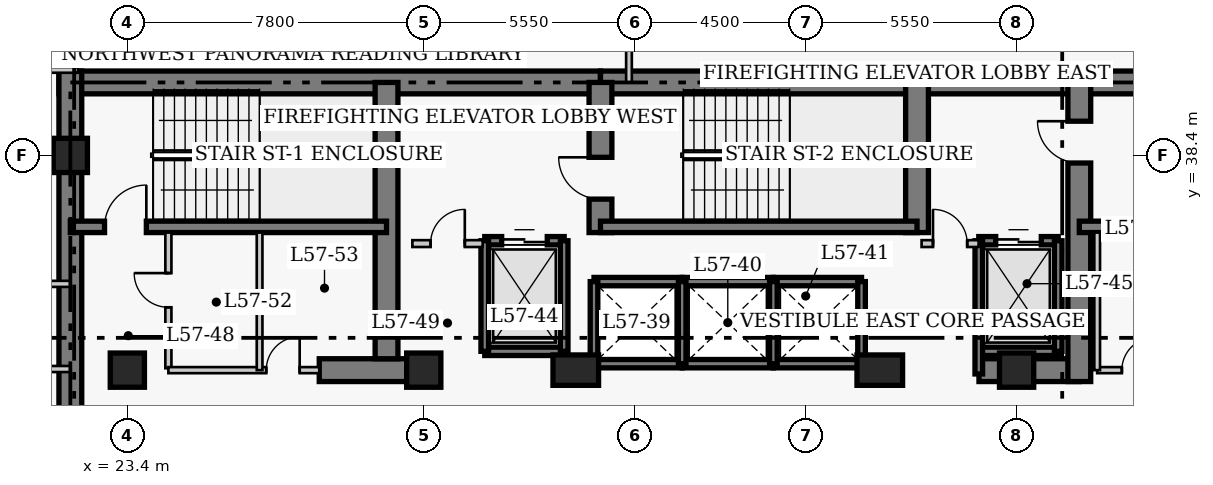
"""IFC4 building model, lengths in metres.
Left out: names, types, materials, properties, quantities, classifications, styles, units other than length and angle.
Written with IfcOpenShell. Run it as: python <this file> out.ifc"""

import sys

from ifc_helpers import new_model, si_unit, direction, frame, frame_2d, origin, origin_2d, place, context, subcontext, project, spatial, rectangle, extrude, element, fill, save


model = new_model("IFC4")
c1 = context("Model", 3, precision=1e-05, world=origin(), true_north=direction((0.0, 1.0)))
c2 = subcontext(c1, "Body", "Model", "MODEL_VIEW")
j1 = project(units=[si_unit("LENGTHUNIT", "METRE"), si_unit("PLANEANGLEUNIT", "RADIAN")], contexts=[c1])
p1 = place(None, origin())
s1 = spatial("IfcSite", under=j1, at=p1, CompositionType="ELEMENT")
p2 = place(p1, origin())
s2 = spatial("IfcBuilding", under=s1, at=p2, CompositionType="ELEMENT")
p3 = place(p2, frame((0.0, 0.0, 228.0)))
s3 = spatial("IfcBuildingStorey", under=s2, at=p3, CompositionType="ELEMENT", Elevation=228.0)
p4 = place(p3, frame((21.6, 40.32, 0.0), z_axis=(0.0, 0.0, 1.0), x_axis=(1.0, 0.0, 0.0)))
e1 = element("IfcWall", 1, at=p4, inside=s3, PredefinedType="SHEAR", context=c2, shape_type="SweptSolid", body=[
    extrude(rectangle(XDim=14.25, YDim=0.6, at=frame_2d((7.125, 0.0))), origin(), (0.0, 0.0, 1.0), 3.9),
])
p5 = place(p3, frame((35.85, 40.32, 0.0), z_axis=(0.0, 0.0, 1.0), x_axis=(1.0, 0.0, 0.0)))
e2 = element("IfcWall", 2, at=p5, inside=s3, PredefinedType="SHEAR", context=c2, shape_type="SweptSolid", body=[
    extrude(rectangle(XDim=12.6, YDim=0.6, at=frame_2d((6.3, 0.0))), origin(), (0.0, 0.0, 1.0), 3.9),
])
p6 = place(p3, frame((48.45, 40.32, 0.0), z_axis=(0.0, 0.0, 1.0), x_axis=(1.0, 0.0, 0.0)))
e3 = element("IfcWall", 3, at=p6, inside=s3, PredefinedType="SHEAR", context=c2, shape_type="SweptSolid", body=[
    extrude(rectangle(XDim=8.67, YDim=0.6, at=frame_2d((4.335, 0.0))), origin(), (0.0, 0.0, 1.0), 3.9),
])
p7 = place(p3, frame((21.9, 27.05, 0.0), z_axis=(0.0, 0.0, 1.0), x_axis=(0.0, 1.0, 0.0)))
e4 = element("IfcWall", 4, at=p7, inside=s3, PredefinedType="SHEAR", context=c2, shape_type="SweptSolid", body=[
    extrude(rectangle(XDim=13.57, YDim=0.6, at=frame_2d((6.785, 0.0))), origin(), (0.0, 0.0, 1.0), 3.9),
])
p8 = place(p3, frame((28.45, 32.75, 0.0), z_axis=(0.0, 0.0, 1.0), x_axis=(1.0, 0.0, 0.0)))
e5 = element("IfcWall", 5, at=p8, inside=s3, PredefinedType="SHEAR", context=c2, shape_type="SweptSolid", body=[
    extrude(rectangle(XDim=2.4, YDim=0.6, at=frame_2d((1.2, 0.0))), origin(), (0.0, 0.0, 1.0), 3.9),
])
p9 = place(p3, frame((45.81, 32.75, 0.0), z_axis=(0.0, 0.0, 1.0), x_axis=(1.0, 0.0, 0.0)))
e6 = element("IfcWall", 6, at=p9, inside=s3, PredefinedType="SHEAR", context=c2, shape_type="SweptSolid", body=[
    extrude(rectangle(XDim=2.64, YDim=0.6, at=frame_2d((1.32, 0.0))), origin(), (0.0, 0.0, 1.0), 3.9),
])
p10 = place(p3, frame((30.22, 33.05, 0.0), z_axis=(0.0, 0.0, 1.0), x_axis=(0.0, 1.0, 0.0)))
e7 = element("IfcWall", 7, at=p10, inside=s3, PredefinedType="SHEAR", context=c2, shape_type="SweptSolid", body=[
    extrude(rectangle(XDim=7.27, YDim=0.6, at=frame_2d((3.635, 0.0))), origin(), (0.0, 0.0, 1.0), 3.9),
])
p11 = place(p3, frame((35.85, 36.37, 0.0), z_axis=(0.0, 0.0, 1.0), x_axis=(0.0, 1.0, 0.0)))
e8 = element("IfcWall", 8, at=p11, inside=s3, PredefinedType="SHEAR", context=c2, shape_type="SweptSolid", body=[
    extrude(rectangle(XDim=3.95, YDim=0.6, at=frame_2d((1.975, 0.0))), origin(), (0.0, 0.0, 1.0), 3.9),
])
p12 = place(p11, frame((0.88, 0.0, 0.0)))
e9 = element("IfcOpeningElement", 9, at=p12, cuts=e8, PredefinedType="OPENING", context=c2, shape_type="SweptSolid", body=[
    extrude(rectangle(XDim=1.1, YDim=2.15, at=frame_2d((0.55, 1.075))), frame((0.0, 0.31, 0.0), z_axis=(0.0, -1.0, 0.0), x_axis=(1.0, 0.0, 0.0)), (0.0, 0.0, 1.0), 0.62),
])
p13 = place(p3, frame((44.18, 36.37, 0.0), z_axis=(0.0, 0.0, 1.0), x_axis=(0.0, 1.0, 0.0)))
e10 = element("IfcWall", 10, at=p13, inside=s3, PredefinedType="SHEAR", context=c2, shape_type="SweptSolid", body=[
    extrude(rectangle(XDim=3.95, YDim=0.6, at=frame_2d((1.975, 0.0))), origin(), (0.0, 0.0, 1.0), 3.9),
])
p14 = place(p3, frame((48.45, 32.45, 0.0), z_axis=(0.0, 0.0, 1.0), x_axis=(0.0, 1.0, 0.0)))
e11 = element("IfcWall", 11, at=p14, inside=s3, PredefinedType="SHEAR", context=c2, shape_type="SweptSolid", body=[
    extrude(rectangle(XDim=7.87, YDim=0.6, at=frame_2d((3.935, 0.0))), origin(), (0.0, 0.0, 1.0), 3.9),
])
p15 = place(p14, frame((5.75, 0.0, 0.0)))
e12 = element("IfcOpeningElement", 12, at=p15, cuts=e11, PredefinedType="OPENING", context=c2, shape_type="SweptSolid", body=[
    extrude(rectangle(XDim=1.1, YDim=2.15, at=frame_2d((0.55, 1.075))), frame((0.0, 0.31, 0.0), z_axis=(0.0, -1.0, 0.0), x_axis=(1.0, 0.0, 0.0)), (0.0, 0.0, 1.0), 0.62),
])
p16 = place(p3, frame((21.9, 36.52, 0.0), z_axis=(0.0, 0.0, 1.0), x_axis=(1.0, 0.0, 0.0)))
e13 = element("IfcWall", 13, at=p16, inside=s3, PredefinedType="SHEAR", context=c2, shape_type="SweptSolid", body=[
    extrude(rectangle(XDim=8.32, YDim=0.3, at=frame_2d((4.16, 0.0))), origin(), (0.0, 0.0, 1.0), 3.9),
])
p17 = place(p16, frame((0.9, 0.0, 0.0)))
e14 = element("IfcOpeningElement", 14, at=p17, cuts=e13, PredefinedType="OPENING", context=c2, shape_type="SweptSolid", body=[
    extrude(rectangle(XDim=1.1, YDim=2.15, at=frame_2d((0.55, 1.075))), frame((0.0, 0.16, 0.0), z_axis=(0.0, -1.0, 0.0), x_axis=(1.0, 0.0, 0.0)), (0.0, 0.0, 1.0), 0.32),
])
p18 = place(p3, frame((35.85, 36.52, 0.0), z_axis=(0.0, 0.0, 1.0), x_axis=(1.0, 0.0, 0.0)))
e15 = element("IfcWall", 15, at=p18, inside=s3, PredefinedType="SHEAR", context=c2, shape_type="SweptSolid", body=[
    extrude(rectangle(XDim=8.33, YDim=0.3, at=frame_2d((4.165, 0.0))), origin(), (0.0, 0.0, 1.0), 3.9),
])
p19 = place(p3, frame((48.45, 36.52, 0.0), z_axis=(0.0, 0.0, 1.0), x_axis=(1.0, 0.0, 0.0)))
e16 = element("IfcWall", 16, at=p19, inside=s3, PredefinedType="SHEAR", context=c2, shape_type="SweptSolid", body=[
    extrude(rectangle(XDim=8.37, YDim=0.3, at=frame_2d((4.185, 0.0))), origin(), (0.0, 0.0, 1.0), 3.9),
])
for number, where, z_axis, x_axis in (
    (17, (21.9, 38.4, 0.0), (0.0, 0.0, 1.0), (1.0, 0.0, 0.0)),
    (18, (23.4, 32.75, 0.0), (0.0, 0.0, 1.0), (1.0, 0.0, 0.0)),
    (19, (31.2, 32.75, 0.0), (0.0, 0.0, 1.0), (1.0, 0.0, 0.0)),
):
    element("IfcColumn", number, at=place(p3, frame(where, z_axis=z_axis, x_axis=x_axis)), inside=s3, PredefinedType="COLUMN", context=c2, shape_type="SweptSolid", body=[
        extrude(rectangle(XDim=0.9, YDim=0.9, at=origin_2d()), origin(), (0.0, 0.0, 1.0), 3.9),
    ])
for number, where, z_axis, x_axis in (
    (20, (35.2, 32.75, 0.0), (0.0, 0.0, 1.0), (1.0, 0.0, 0.0)),
    (21, (43.2, 32.75, 0.0), (0.0, 0.0, 1.0), (1.0, 0.0, 0.0)),
):
    element("IfcColumn", number, at=place(p3, frame(where, z_axis=z_axis, x_axis=x_axis)), inside=s3, PredefinedType="COLUMN", context=c2, shape_type="SweptSolid", body=[
        extrude(rectangle(XDim=1.2, YDim=0.8, at=origin_2d()), origin(), (0.0, 0.0, 1.0), 3.9),
    ])
p20 = place(p3, frame((46.8, 32.75, 0.0), z_axis=(0.0, 0.0, 1.0), x_axis=(1.0, 0.0, 0.0)))
e22 = element("IfcColumn", 22, at=p20, inside=s3, PredefinedType="COLUMN", context=c2, shape_type="SweptSolid", body=[
    extrude(rectangle(XDim=0.9, YDim=0.9, at=origin_2d()), origin(), (0.0, 0.0, 1.0), 3.9),
])
for number, where, z_axis, x_axis in (
    (23, (35.68, 35.08, 0.0), (0.0, 0.0, 1.0), (1.0, 0.0, 0.0)),
    (24, (35.68, 32.92, 0.0), (0.0, 0.0, 1.0), (1.0, 0.0, 0.0)),
):
    element("IfcWall", number, at=place(p3, frame(where, z_axis=z_axis, x_axis=x_axis)), inside=s3, PredefinedType="SHEAR", context=c2, shape_type="SweptSolid", body=[
        extrude(rectangle(XDim=2.32, YDim=0.22, at=frame_2d((1.16, 0.0))), origin(), (0.0, 0.0, 1.0), 3.9),
    ])
p21 = place(p3, frame((35.68, 32.92, 0.0), z_axis=(0.0, 0.0, 1.0), x_axis=(0.0, 1.0, 0.0)))
e25 = element("IfcWall", 25, at=p21, inside=s3, PredefinedType="SHEAR", context=c2, shape_type="SweptSolid", body=[
    extrude(rectangle(XDim=2.16, YDim=0.2, at=frame_2d((1.08, 0.0))), origin(), (0.0, 0.0, 1.0), 3.9),
])
for number, where, z_axis, x_axis in (
    (26, (38.0, 35.08, 0.0), (0.0, 0.0, 1.0), (1.0, 0.0, 0.0)),
    (27, (38.0, 32.92, 0.0), (0.0, 0.0, 1.0), (1.0, 0.0, 0.0)),
):
    element("IfcWall", number, at=place(p3, frame(where, z_axis=z_axis, x_axis=x_axis)), inside=s3, PredefinedType="SHEAR", context=c2, shape_type="SweptSolid", body=[
        extrude(rectangle(XDim=2.4, YDim=0.22, at=frame_2d((1.2, 0.0))), origin(), (0.0, 0.0, 1.0), 3.9),
    ])
p22 = place(p3, frame((38.0, 32.92, 0.0), z_axis=(0.0, 0.0, 1.0), x_axis=(0.0, 1.0, 0.0)))
e28 = element("IfcWall", 28, at=p22, inside=s3, PredefinedType="SHEAR", context=c2, shape_type="SweptSolid", body=[
    extrude(rectangle(XDim=2.16, YDim=0.2, at=frame_2d((1.08, 0.0))), origin(), (0.0, 0.0, 1.0), 3.9),
])
for number, where, z_axis, x_axis in (
    (29, (40.4, 35.08, 0.0), (0.0, 0.0, 1.0), (1.0, 0.0, 0.0)),
    (30, (40.4, 32.92, 0.0), (0.0, 0.0, 1.0), (1.0, 0.0, 0.0)),
):
    element("IfcWall", number, at=place(p3, frame(where, z_axis=z_axis, x_axis=x_axis)), inside=s3, PredefinedType="SHEAR", context=c2, shape_type="SweptSolid", body=[
        extrude(rectangle(XDim=2.32, YDim=0.22, at=frame_2d((1.16, 0.0))), origin(), (0.0, 0.0, 1.0), 3.9),
    ])
for number, where, z_axis, x_axis in (
    (31, (40.4, 32.92, 0.0), (0.0, 0.0, 1.0), (0.0, 1.0, 0.0)),
    (32, (42.72, 32.92, 0.0), (0.0, 0.0, 1.0), (0.0, 1.0, 0.0)),
):
    element("IfcWall", number, at=place(p3, frame(where, z_axis=z_axis, x_axis=x_axis)), inside=s3, PredefinedType="SHEAR", context=c2, shape_type="SweptSolid", body=[
        extrude(rectangle(XDim=2.16, YDim=0.2, at=frame_2d((1.08, 0.0))), origin(), (0.0, 0.0, 1.0), 3.9),
    ])
p23 = place(p3, frame((32.805, 36.155, 0.0), z_axis=(0.0, 0.0, 1.0), x_axis=(1.0, 0.0, 0.0)))
e33 = element("IfcWall", 33, at=p23, inside=s3, PredefinedType="SHEAR", context=c2, shape_type="SweptSolid", body=[
    extrude(rectangle(XDim=2.09, YDim=0.22, at=frame_2d((1.045, 0.0))), origin(), (0.0, 0.0, 1.0), 3.9),
])
p24 = place(p23, frame((0.445, 0.0, 0.0)))
e34 = element("IfcOpeningElement", 34, at=p24, cuts=e33, PredefinedType="OPENING", context=c2, shape_type="SweptSolid", body=[
    extrude(rectangle(XDim=1.2, YDim=2.15, at=frame_2d((0.6, 1.075))), frame((0.0, 0.12, 0.0), z_axis=(0.0, -1.0, 0.0), x_axis=(1.0, 0.0, 0.0)), (0.0, 0.0, 1.0), 0.24),
])
p25 = place(p3, frame((32.805, 33.245, 0.0), z_axis=(0.0, 0.0, 1.0), x_axis=(1.0, 0.0, 0.0)))
e35 = element("IfcWall", 35, at=p25, inside=s3, PredefinedType="SHEAR", context=c2, shape_type="SweptSolid", body=[
    extrude(rectangle(XDim=2.09, YDim=0.22, at=frame_2d((1.045, 0.0))), origin(), (0.0, 0.0, 1.0), 3.9),
])
for number, where, z_axis, x_axis in (
    (36, (32.805, 33.245, 0.0), (0.0, 0.0, 1.0), (0.0, 1.0, 0.0)),
    (37, (34.895, 33.245, 0.0), (0.0, 0.0, 1.0), (0.0, 1.0, 0.0)),
):
    element("IfcWall", number, at=place(p3, frame(where, z_axis=z_axis, x_axis=x_axis)), inside=s3, PredefinedType="SHEAR", context=c2, shape_type="SweptSolid", body=[
        extrude(rectangle(XDim=2.91, YDim=0.2, at=frame_2d((1.455, 0.0))), origin(), (0.0, 0.0, 1.0), 3.9),
    ])
p26 = place(p3, frame((45.805, 36.155, 0.0), z_axis=(0.0, 0.0, 1.0), x_axis=(1.0, 0.0, 0.0)))
e38 = element("IfcWall", 38, at=p26, inside=s3, PredefinedType="SHEAR", context=c2, shape_type="SweptSolid", body=[
    extrude(rectangle(XDim=2.09, YDim=0.22, at=frame_2d((1.045, 0.0))), origin(), (0.0, 0.0, 1.0), 3.9),
])
p27 = place(p26, frame((0.445, 0.0, 0.0)))
e39 = element("IfcOpeningElement", 39, at=p27, cuts=e38, PredefinedType="OPENING", context=c2, shape_type="SweptSolid", body=[
    extrude(rectangle(XDim=1.2, YDim=2.15, at=frame_2d((0.6, 1.075))), frame((0.0, 0.12, 0.0), z_axis=(0.0, -1.0, 0.0), x_axis=(1.0, 0.0, 0.0)), (0.0, 0.0, 1.0), 0.24),
])
p28 = place(p3, frame((45.805, 33.245, 0.0), z_axis=(0.0, 0.0, 1.0), x_axis=(1.0, 0.0, 0.0)))
e40 = element("IfcWall", 40, at=p28, inside=s3, PredefinedType="SHEAR", context=c2, shape_type="SweptSolid", body=[
    extrude(rectangle(XDim=2.09, YDim=0.22, at=frame_2d((1.045, 0.0))), origin(), (0.0, 0.0, 1.0), 3.9),
])
p29 = place(p3, frame((45.805, 32.65, 0.0), z_axis=(0.0, 0.0, 1.0), x_axis=(0.0, 1.0, 0.0)))
e41 = element("IfcWall", 41, at=p29, inside=s3, PredefinedType="SHEAR", context=c2, shape_type="SweptSolid", body=[
    extrude(rectangle(XDim=3.505, YDim=0.2, at=frame_2d((1.752, 0.0))), origin(), (0.0, 0.0, 1.0), 3.9),
])
p30 = place(p3, frame((47.895, 33.245, 0.0), z_axis=(0.0, 0.0, 1.0), x_axis=(0.0, 1.0, 0.0)))
e42 = element("IfcWall", 42, at=p30, inside=s3, PredefinedType="SHEAR", context=c2, shape_type="SweptSolid", body=[
    extrude(rectangle(XDim=2.91, YDim=0.2, at=frame_2d((1.455, 0.0))), origin(), (0.0, 0.0, 1.0), 3.9),
])
p31 = place(p3, frame((30.9, 36.08, 0.0), z_axis=(0.0, 0.0, 1.0), x_axis=(1.0, 0.0, 0.0)))
e43 = element("IfcWall", 43, at=p31, inside=s3, PredefinedType="PARTITIONING", context=c2, shape_type="SweptSolid", body=[
    extrude(rectangle(XDim=1.85, YDim=0.18, at=frame_2d((0.925, 0.0))), origin(), (0.0, 0.0, 1.0), 3.56),
])
p32 = place(p31, frame((0.48, 0.0, 0.0)))
e44 = element("IfcOpeningElement", 44, at=p32, cuts=e43, PredefinedType="OPENING", context=c2, shape_type="SweptSolid", body=[
    extrude(rectangle(XDim=0.9, YDim=2.15, at=frame_2d((0.45, 1.075))), frame((0.0, 0.1, 0.0), z_axis=(0.0, -1.0, 0.0), x_axis=(1.0, 0.0, 0.0)), (0.0, 0.0, 1.0), 0.2),
])
p33 = place(p3, frame((44.3, 36.08, 0.0), z_axis=(0.0, 0.0, 1.0), x_axis=(1.0, 0.0, 0.0)))
e45 = element("IfcWall", 45, at=p33, inside=s3, PredefinedType="PARTITIONING", context=c2, shape_type="SweptSolid", body=[
    extrude(rectangle(XDim=1.5, YDim=0.18, at=frame_2d((0.75, 0.0))), origin(), (0.0, 0.0, 1.0), 3.56),
])
p34 = place(p33, frame((0.3, 0.0, 0.0)))
e46 = element("IfcOpeningElement", 46, at=p34, cuts=e45, PredefinedType="OPENING", context=c2, shape_type="SweptSolid", body=[
    extrude(rectangle(XDim=0.9, YDim=2.15, at=frame_2d((0.45, 1.075))), frame((0.0, 0.1, 0.0), z_axis=(0.0, -1.0, 0.0), x_axis=(1.0, 0.0, 0.0)), (0.0, 0.0, 1.0), 0.2),
])
p35 = place(p3, frame((24.48, 32.8, 0.0), z_axis=(0.0, 0.0, 1.0), x_axis=(0.0, 1.0, 0.0)))
e47 = element("IfcWall", 47, at=p35, inside=s3, PredefinedType="PARTITIONING", context=c2, shape_type="SweptSolid", body=[
    extrude(rectangle(XDim=3.57, YDim=0.16, at=frame_2d((1.785, 0.0))), origin(), (0.0, 0.0, 1.0), 3.56),
])
p36 = place(p35, frame((1.604, 0.0, 0.0)))
e48 = element("IfcOpeningElement", 48, at=p36, cuts=e47, PredefinedType="OPENING", context=c2, shape_type="SweptSolid", body=[
    extrude(rectangle(XDim=0.9, YDim=2.1, at=frame_2d((0.45, 1.05))), frame((0.0, 0.09, 0.0), z_axis=(0.0, -1.0, 0.0), x_axis=(1.0, 0.0, 0.0)), (0.0, 0.0, 1.0), 0.18),
])
p37 = place(p3, frame((24.48, 32.75, 0.0), z_axis=(0.0, 0.0, 1.0), x_axis=(1.0, 0.0, 0.0)))
e49 = element("IfcWall", 49, at=p37, inside=s3, PredefinedType="PARTITIONING", context=c2, shape_type="SweptSolid", body=[
    extrude(rectangle(XDim=3.97, YDim=0.16, at=frame_2d((1.985, 0.0))), origin(), (0.0, 0.0, 1.0), 3.56),
])
p38 = place(p37, frame((2.575, 0.0, 0.0)))
e50 = element("IfcOpeningElement", 50, at=p38, cuts=e49, PredefinedType="OPENING", context=c2, shape_type="SweptSolid", body=[
    extrude(rectangle(XDim=0.88, YDim=2.05, at=frame_2d((0.44, 1.025))), frame((0.0, 0.09, 0.0), z_axis=(0.0, -1.0, 0.0), x_axis=(1.0, 0.0, 0.0)), (0.0, 0.0, 1.0), 0.18),
])
p39 = place(p3, frame((48.92, 32.75, 0.0), z_axis=(0.0, 0.0, 1.0), x_axis=(1.0, 0.0, 0.0)))
e51 = element("IfcWall", 51, at=p39, inside=s3, PredefinedType="PARTITIONING", context=c2, shape_type="SweptSolid", body=[
    extrude(rectangle(XDim=2.2, YDim=0.16, at=frame_2d((1.1, 0.0))), origin(), (0.0, 0.0, 1.0), 3.56),
])
p40 = place(p39, frame((0.65, 0.0, 0.0)))
e52 = element("IfcOpeningElement", 52, at=p40, cuts=e51, PredefinedType="OPENING", context=c2, shape_type="SweptSolid", body=[
    extrude(rectangle(XDim=0.86, YDim=2.05, at=frame_2d((0.43, 1.025))), frame((0.0, 0.09, 0.0), z_axis=(0.0, -1.0, 0.0), x_axis=(1.0, 0.0, 0.0)), (0.0, 0.0, 1.0), 0.18),
])
for number, where, z_axis, x_axis in (
    (53, (48.92, 32.75, 0.0), (0.0, 0.0, 1.0), (0.0, 1.0, 0.0)),
    (54, (26.88, 32.75, 0.0), (0.0, 0.0, 1.0), (0.0, 1.0, 0.0)),
):
    element("IfcWall", number, at=place(p3, frame(where, z_axis=z_axis, x_axis=x_axis)), inside=s3, PredefinedType="PARTITIONING", context=c2, shape_type="SweptSolid", body=[
        extrude(rectangle(XDim=3.62, YDim=0.15, at=frame_2d((1.81, 0.0))), origin(), (0.0, 0.0, 1.0), 3.56),
    ])
for number, where, z_axis, x_axis in (
    (55, (19.96, 35.02, 0.0), (0.0, 0.0, 1.0), (1.0, 0.0, 0.0)),
    (56, (19.96, 32.78, 0.0), (0.0, 0.0, 1.0), (1.0, 0.0, 0.0)),
):
    element("IfcWall", number, at=place(p3, frame(where, z_axis=z_axis, x_axis=x_axis)), inside=s3, PredefinedType="PARTITIONING", context=c2, shape_type="SweptSolid", body=[
        extrude(rectangle(XDim=1.94, YDim=0.16, at=frame_2d((0.97, 0.0))), origin(), (0.0, 0.0, 1.0), 3.56),
    ])
p41 = place(p3, frame((17.74, 40.65, 0.0), z_axis=(0.0, 0.0, 1.0), x_axis=(1.0, 0.0, 0.0)))
e57 = element("IfcWall", 57, at=p41, inside=s3, PredefinedType="PARTITIONING", context=c2, shape_type="SweptSolid", body=[
    extrude(rectangle(XDim=4.36, YDim=0.15, at=frame_2d((2.18, 0.0))), origin(), (0.0, 0.0, 1.0), 3.56),
])
p42 = place(p41, frame((0.55, 0.0, 0.0)))
e58 = element("IfcOpeningElement", 58, at=p42, cuts=e57, PredefinedType="OPENING", context=c2, shape_type="SweptSolid", body=[
    extrude(rectangle(XDim=1.0, YDim=2.15, at=frame_2d((0.5, 1.075))), frame((0.0, 0.085, 0.0), z_axis=(0.0, -1.0, 0.0), x_axis=(1.0, 0.0, 0.0)), (0.0, 0.0, 1.0), 0.17),
])
p43 = place(p3, frame((36.6, 40.32, 0.0), z_axis=(0.0, 0.0, 1.0), x_axis=(0.0, 1.0, 0.0)))
e59 = element("IfcWall", 59, at=p43, inside=s3, PredefinedType="PARTITIONING", context=c2, shape_type="SweptSolid", body=[
    extrude(rectangle(XDim=2.345, YDim=0.15, at=frame_2d((1.172, 0.0))), origin(), (0.0, 0.0, 1.0), 3.56),
])
p44 = place(p24, origin())
e60 = element("IfcDoor", 60, at=p44, inside=s3, OperationType="DOUBLE_DOOR_SLIDING", PredefinedType="DOOR", context=c2, shape_type="SweptSolid", body=[
    extrude(rectangle(XDim=1.2, YDim=2.15, at=frame_2d((0.6, 1.075))), frame((0.0, 0.025, 0.0), z_axis=(0.0, -1.0, 0.0), x_axis=(1.0, 0.0, 0.0)), (0.0, 0.0, 1.0), 0.05),
])
fill(e34, e60)
p45 = place(p27, origin())
e61 = element("IfcDoor", 61, at=p45, inside=s3, OperationType="DOUBLE_DOOR_SLIDING", PredefinedType="DOOR", context=c2, shape_type="SweptSolid", body=[
    extrude(rectangle(XDim=1.2, YDim=2.15, at=frame_2d((0.6, 1.075))), frame((0.0, 0.025, 0.0), z_axis=(0.0, -1.0, 0.0), x_axis=(1.0, 0.0, 0.0)), (0.0, 0.0, 1.0), 0.05),
])
fill(e39, e61)
p46 = place(p32, origin())
e62 = element("IfcDoor", 62, at=p46, inside=s3, OperationType="SINGLE_SWING_RIGHT", PredefinedType="DOOR", context=c2, shape_type="SweptSolid", body=[
    extrude(rectangle(XDim=0.9, YDim=2.15, at=frame_2d((0.45, 1.075))), frame((0.0, 0.025, 0.0), z_axis=(0.0, -1.0, 0.0), x_axis=(1.0, 0.0, 0.0)), (0.0, 0.0, 1.0), 0.05),
])
fill(e44, e62)
p47 = place(p34, origin())
e63 = element("IfcDoor", 63, at=p47, inside=s3, OperationType="SINGLE_SWING_LEFT", PredefinedType="DOOR", context=c2, shape_type="SweptSolid", body=[
    extrude(rectangle(XDim=0.9, YDim=2.15, at=frame_2d((0.45, 1.075))), frame((0.0, 0.025, 0.0), z_axis=(0.0, -1.0, 0.0), x_axis=(1.0, 0.0, 0.0)), (0.0, 0.0, 1.0), 0.05),
])
fill(e46, e63)
p48 = place(p36, origin())
e64 = element("IfcDoor", 64, at=p48, inside=s3, OperationType="SINGLE_SWING_RIGHT", PredefinedType="DOOR", context=c2, shape_type="SweptSolid", body=[
    extrude(rectangle(XDim=0.9, YDim=2.1, at=frame_2d((0.45, 1.05))), frame((0.0, 0.025, 0.0), z_axis=(0.0, -1.0, 0.0), x_axis=(1.0, 0.0, 0.0)), (0.0, 0.0, 1.0), 0.05),
])
fill(e48, e64)
p49 = place(p38, origin())
e65 = element("IfcDoor", 65, at=p49, inside=s3, OperationType="SINGLE_SWING_RIGHT", PredefinedType="DOOR", context=c2, shape_type="SweptSolid", body=[
    extrude(rectangle(XDim=0.88, YDim=2.05, at=frame_2d((0.44, 1.025))), frame((0.0, 0.025, 0.0), z_axis=(0.0, -1.0, 0.0), x_axis=(1.0, 0.0, 0.0)), (0.0, 0.0, 1.0), 0.05),
])
fill(e50, e65)
p50 = place(p40, origin())
e66 = element("IfcDoor", 66, at=p50, inside=s3, OperationType="SINGLE_SWING_RIGHT", PredefinedType="DOOR", context=c2, shape_type="SweptSolid", body=[
    extrude(rectangle(XDim=0.86, YDim=2.05, at=frame_2d((0.43, 1.025))), frame((0.0, 0.025, 0.0), z_axis=(0.0, -1.0, 0.0), x_axis=(1.0, 0.0, 0.0)), (0.0, 0.0, 1.0), 0.05),
])
fill(e52, e66)
p51 = place(p17, origin())
e67 = element("IfcDoor", 67, at=p51, inside=s3, OperationType="SINGLE_SWING_RIGHT", PredefinedType="DOOR", context=c2, shape_type="SweptSolid", body=[
    extrude(rectangle(XDim=1.1, YDim=2.15, at=frame_2d((0.55, 1.075))), frame((0.0, 0.025, 0.0), z_axis=(0.0, -1.0, 0.0), x_axis=(1.0, 0.0, 0.0)), (0.0, 0.0, 1.0), 0.05),
])
fill(e14, e67)
p52 = place(p12, origin())
e68 = element("IfcDoor", 68, at=p52, inside=s3, OperationType="SINGLE_SWING_RIGHT", PredefinedType="DOOR", context=c2, shape_type="SweptSolid", body=[
    extrude(rectangle(XDim=1.1, YDim=2.15, at=frame_2d((0.55, 1.075))), frame((0.0, 0.025, 0.0), z_axis=(0.0, -1.0, 0.0), x_axis=(1.0, 0.0, 0.0)), (0.0, 0.0, 1.0), 0.05),
])
fill(e9, e68)
p53 = place(p15, origin())
e69 = element("IfcDoor", 69, at=p53, inside=s3, OperationType="SINGLE_SWING_RIGHT", PredefinedType="DOOR", context=c2, shape_type="SweptSolid", body=[
    extrude(rectangle(XDim=1.1, YDim=2.15, at=frame_2d((0.55, 1.075))), frame((0.0, 0.025, 0.0), z_axis=(0.0, -1.0, 0.0), x_axis=(1.0, 0.0, 0.0)), (0.0, 0.0, 1.0), 0.05),
])
fill(e12, e69)
save(model, sys.argv[1])
